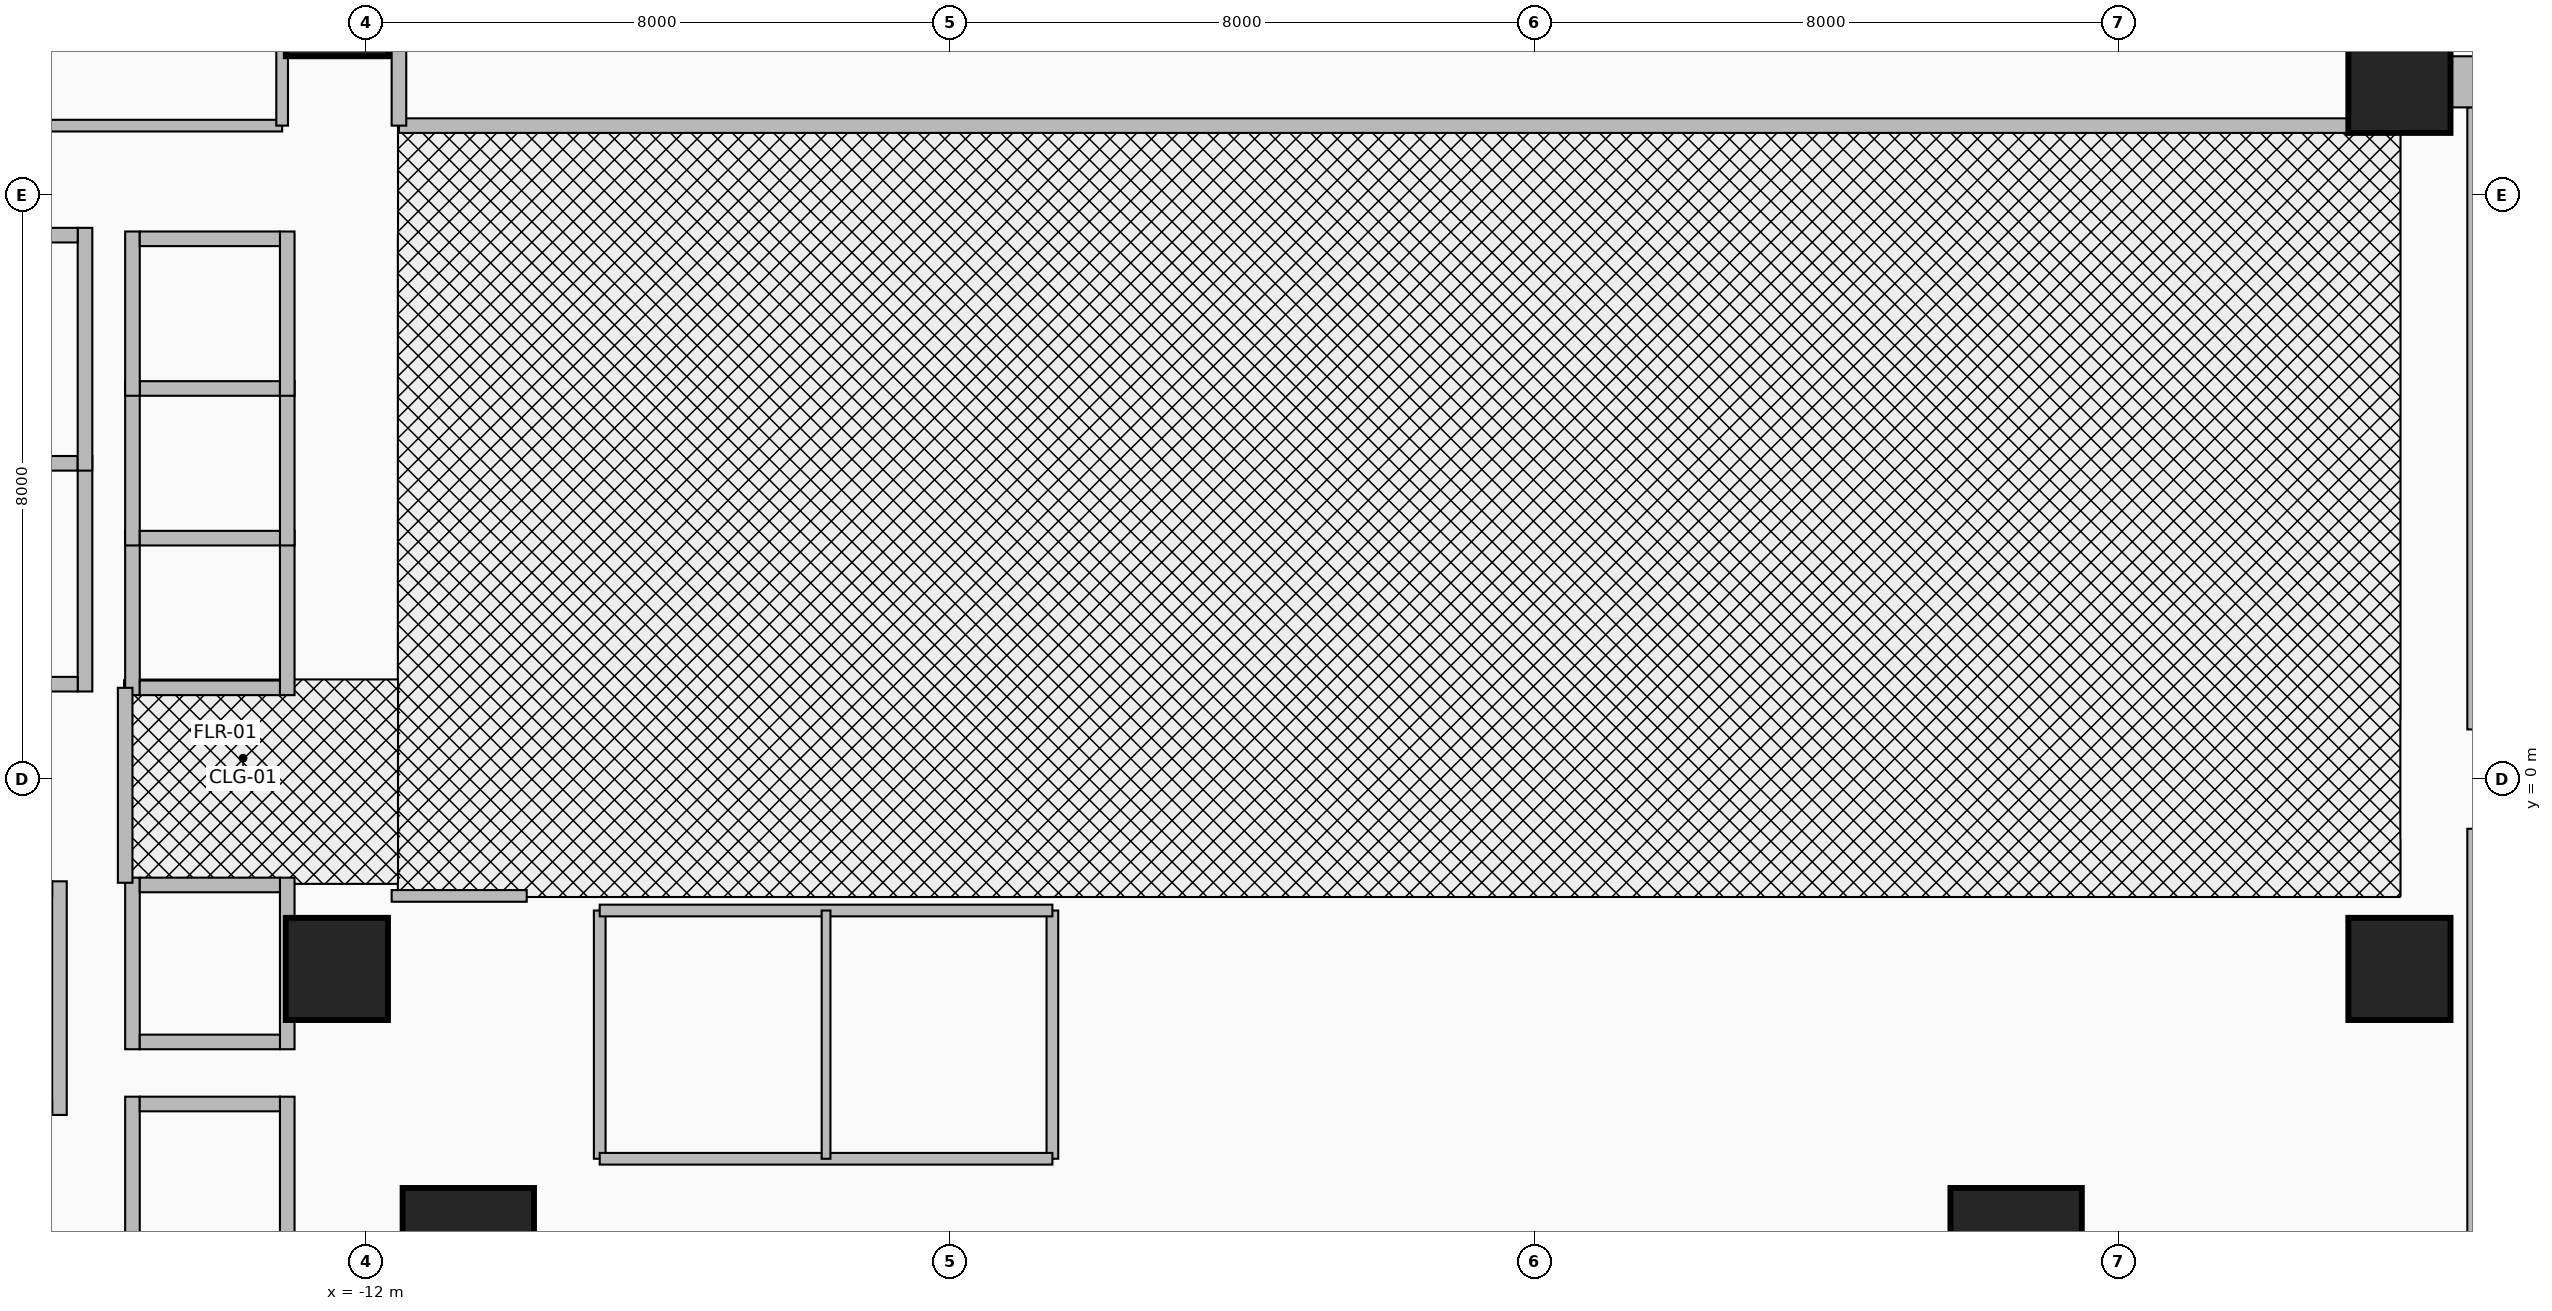
"""IFC4 building model, lengths in metres.
Left out: names, types, materials, properties, quantities, classifications, styles, units other than length and angle.
Written with IfcOpenShell. Run it as: python <this file> out.ifc"""

import sys

from ifc_helpers import new_model, si_unit, direction, frame, frame_2d, origin, origin_2d, place, context, subcontext, project, spatial, rectangle, extrude, source, transform, mapped, element, fill, save


model = new_model("IFC4")
c1 = context("Model", 3, precision=1e-05, world=origin(), true_north=direction((0.0, 1.0)))
c2 = subcontext(c1, "Body", "Model", "MODEL_VIEW")
j1 = project(units=[si_unit("LENGTHUNIT", "METRE"), si_unit("PLANEANGLEUNIT", "RADIAN")], contexts=[c1])
p1 = place(None, origin())
s1 = spatial("IfcSite", under=j1, at=p1, CompositionType="ELEMENT")
p2 = place(p1, origin())
s2 = spatial("IfcBuilding", under=s1, at=p2, CompositionType="ELEMENT")
p3 = place(p2, frame((0.0, 0.0, 20.8)))
s3 = spatial("IfcBuildingStorey", under=s2, at=p3, CompositionType="ELEMENT", Elevation=20.8)
for number, where, z_axis, x_axis in (
    (1, (16.89, 0.68, 0.0), (0.0, 0.0, 1.0), (0.0, 1.0, 0.0)),
    (2, (16.89, -9.2, 0.0), (0.0, 0.0, 1.0), (0.0, 1.0, 0.0)),
):
    element("IfcWall", number, at=place(p3, frame(where, z_axis=z_axis, x_axis=x_axis)), inside=s3, PredefinedType="SHEAR", context=c2, shape_type="SweptSolid", body=[
        extrude(rectangle(XDim=8.52, YDim=0.22, at=frame_2d((4.26, 0.0))), origin(), (0.0, 0.0, 1.0), 4.96),
    ])
p4 = place(p3, frame((15.85, 9.55, 0.0), z_axis=(0.0, 0.0, 1.0), x_axis=(1.0, 0.0, 0.0)))
e3 = element("IfcWall", 3, at=p4, inside=s3, PredefinedType="SHEAR", context=c2, shape_type="SweptSolid", body=[
    extrude(rectangle(XDim=9.0, YDim=0.7, at=frame_2d((4.5, 0.0))), origin(), (0.0, 0.0, 1.0), 4.96),
])
m1 = source(origin(), c2, "Body", "SweptSolid", [
    extrude(rectangle(XDim=1.4, YDim=1.4, at=origin_2d()), origin(), (0.0, 0.0, 1.0), 5.2),
])
for number, where, z_axis, x_axis in (
    (4, (-12.4, -2.6, 0.0), (0.0, 0.0, 1.0), (1.0, 0.0, 0.0)),
    (5, (-12.4, 10.6, 0.0), (0.0, 0.0, 1.0), (1.0, 0.0, 0.0)),
    (6, (15.85, -2.6, 0.0), (0.0, 0.0, 1.0), (1.0, 0.0, 0.0)),
    (7, (15.85, 9.55, 0.0), (0.0, 0.0, 1.0), (1.0, 0.0, 0.0)),
):
    element("IfcColumn", number, at=place(p3, frame(where, z_axis=z_axis, x_axis=x_axis)), inside=s3, PredefinedType="COLUMN", context=c2, shape_type="MappedRepresentation", body=[
        mapped(m1, transform((0.0, 0.0, 0.0), x_axis=(1.0, 0.0, 0.0), y_axis=(0.0, 1.0, 0.0), z_axis=(0.0, 0.0, 1.0), scale=1.0)),
    ])
m2 = source(origin(), c2, "Body", "SweptSolid", [
    extrude(rectangle(XDim=1.8, YDim=1.8, at=origin_2d()), origin(), (0.0, 0.0, 1.0), 5.2),
])
for number, where, z_axis, x_axis in (
    (8, (-10.6, -6.5, 0.0), (0.0, 0.0, 1.0), (1.0, 0.0, 0.0)),
    (9, (10.6, -6.5, 0.0), (0.0, 0.0, 1.0), (1.0, 0.0, 0.0)),
):
    element("IfcColumn", number, at=place(p3, frame(where, z_axis=z_axis, x_axis=x_axis)), inside=s3, PredefinedType="COLUMN", context=c2, shape_type="MappedRepresentation", body=[
        mapped(m2, transform((0.0, 0.0, 0.0), x_axis=(1.0, 0.0, 0.0), y_axis=(0.0, 1.0, 0.0), z_axis=(0.0, 0.0, 1.0), scale=1.0)),
    ])
p5 = place(p3, frame((-15.85, 1.2, 0.0), z_axis=(0.0, 0.0, 1.0), x_axis=(0.0, 1.0, 0.0)))
e10 = element("IfcWall", 10, at=p5, inside=s3, PredefinedType="MOVABLE", context=c2, shape_type="SweptSolid", body=[
    extrude(rectangle(XDim=3.225, YDim=0.2, at=frame_2d((1.613, 0.0))), origin(), (0.0, 0.0, 1.0), 4.96),
])
p6 = place(p3, frame((-18.55, 1.3, 0.0), z_axis=(0.0, 0.0, 1.0), x_axis=(1.0, 0.0, 0.0)))
e11 = element("IfcWall", 11, at=p6, inside=s3, PredefinedType="MOVABLE", context=c2, shape_type="SweptSolid", body=[
    extrude(rectangle(XDim=2.6, YDim=0.2, at=frame_2d((1.3, 0.0))), origin(), (0.0, 0.0, 1.0), 4.96),
])
p7 = place(p6, frame((0.7, 0.0, 0.0)))
e12 = element("IfcOpeningElement", 12, at=p7, cuts=e11, PredefinedType="OPENING", context=c2, shape_type="SweptSolid", body=[
    extrude(rectangle(XDim=1.2, YDim=2.1, at=frame_2d((0.6, 1.05))), frame((0.0, 0.115, 0.0), z_axis=(0.0, -1.0, 0.0), x_axis=(1.0, 0.0, 0.0)), (0.0, 0.0, 1.0), 0.23),
])
p8 = place(p3, frame((-18.55, 4.325, 0.0), z_axis=(0.0, 0.0, 1.0), x_axis=(1.0, 0.0, 0.0)))
e13 = element("IfcWall", 13, at=p8, inside=s3, PredefinedType="MOVABLE", context=c2, shape_type="SweptSolid", body=[
    extrude(rectangle(XDim=2.6, YDim=0.2, at=frame_2d((1.3, 0.0))), origin(), (0.0, 0.0, 1.0), 4.96),
])
p9 = place(p3, frame((-16.2, -4.6, 0.0), z_axis=(0.0, 0.0, 1.0), x_axis=(0.0, 1.0, 0.0)))
e14 = element("IfcWall", 14, at=p9, inside=s3, PredefinedType="MOVABLE", context=c2, shape_type="SweptSolid", body=[
    extrude(rectangle(XDim=3.2, YDim=0.2, at=frame_2d((1.6, 0.0))), origin(), (0.0, 0.0, 1.0), 4.96),
])
p10 = place(p3, frame((-15.85, 4.225, 0.0), z_axis=(0.0, 0.0, 1.0), x_axis=(0.0, 1.0, 0.0)))
e15 = element("IfcWall", 15, at=p10, inside=s3, PredefinedType="MOVABLE", context=c2, shape_type="SweptSolid", body=[
    extrude(rectangle(XDim=3.325, YDim=0.2, at=frame_2d((1.663, 0.0))), origin(), (0.0, 0.0, 1.0), 4.96),
])
p11 = place(p3, frame((-18.55, 7.45, 0.0), z_axis=(0.0, 0.0, 1.0), x_axis=(1.0, 0.0, 0.0)))
e16 = element("IfcWall", 16, at=p11, inside=s3, PredefinedType="MOVABLE", context=c2, shape_type="SweptSolid", body=[
    extrude(rectangle(XDim=2.6, YDim=0.2, at=frame_2d((1.3, 0.0))), origin(), (0.0, 0.0, 1.0), 4.96),
])
p12 = place(p11, frame((0.7, 0.0, 0.0)))
e17 = element("IfcOpeningElement", 17, at=p12, cuts=e16, PredefinedType="OPENING", context=c2, shape_type="SweptSolid", body=[
    extrude(rectangle(XDim=1.2, YDim=2.1, at=frame_2d((0.6, 1.05))), frame((0.0, 0.115, 0.0), z_axis=(0.0, -1.0, 0.0), x_axis=(1.0, 0.0, 0.0)), (0.0, 0.0, 1.0), 0.23),
])
for number, where, z_axis, x_axis in (
    (18, (-15.2, -6.7, 0.0), (0.0, 0.0, 1.0), (0.0, 1.0, 0.0)),
    (19, (-13.08, -6.7, 0.0), (0.0, 0.0, 1.0), (0.0, 1.0, 0.0)),
):
    element("IfcWall", number, at=place(p3, frame(where, z_axis=z_axis, x_axis=x_axis)), inside=s3, PredefinedType="MOVABLE", context=c2, shape_type="SweptSolid", body=[
        extrude(rectangle(XDim=2.35, YDim=0.2, at=frame_2d((1.175, 0.0))), origin(), (0.0, 0.0, 1.0), 4.96),
    ])
p13 = place(p3, frame((-15.1, -4.45, 0.0), z_axis=(0.0, 0.0, 1.0), x_axis=(1.0, 0.0, 0.0)))
e20 = element("IfcWall", 20, at=p13, inside=s3, PredefinedType="MOVABLE", context=c2, shape_type="SweptSolid", body=[
    extrude(rectangle(XDim=1.92, YDim=0.2, at=frame_2d((0.96, 0.0))), origin(), (0.0, 0.0, 1.0), 4.96),
])
for number, where, z_axis, x_axis in (
    (21, (-15.2, 1.15, 0.0), (0.0, 0.0, 1.0), (0.0, 1.0, 0.0)),
    (22, (-13.08, 1.15, 0.0), (0.0, 0.0, 1.0), (0.0, 1.0, 0.0)),
):
    element("IfcWall", number, at=place(p3, frame(where, z_axis=z_axis, x_axis=x_axis)), inside=s3, PredefinedType="MOVABLE", context=c2, shape_type="SweptSolid", body=[
        extrude(rectangle(XDim=2.25, YDim=0.2, at=frame_2d((1.125, 0.0))), origin(), (0.0, 0.0, 1.0), 4.96),
    ])
p14 = place(p3, frame((-15.1, 1.25, 0.0), z_axis=(0.0, 0.0, 1.0), x_axis=(1.0, 0.0, 0.0)))
e23 = element("IfcWall", 23, at=p14, inside=s3, PredefinedType="MOVABLE", context=c2, shape_type="SweptSolid", body=[
    extrude(rectangle(XDim=1.92, YDim=0.2, at=frame_2d((0.96, 0.0))), origin(), (0.0, 0.0, 1.0), 4.96),
])
for number, where, z_axis, x_axis in (
    (24, (-15.2, 3.2, 0.0), (0.0, 0.0, 1.0), (0.0, 1.0, 0.0)),
    (25, (-13.08, 3.2, 0.0), (0.0, 0.0, 1.0), (0.0, 1.0, 0.0)),
):
    element("IfcWall", number, at=place(p3, frame(where, z_axis=z_axis, x_axis=x_axis)), inside=s3, PredefinedType="MOVABLE", context=c2, shape_type="SweptSolid", body=[
        extrude(rectangle(XDim=2.25, YDim=0.2, at=frame_2d((1.125, 0.0))), origin(), (0.0, 0.0, 1.0), 4.96),
    ])
for number, where, z_axis, x_axis in (
    (26, (-15.1, 3.3, 0.0), (0.0, 0.0, 1.0), (1.0, 0.0, 0.0)),
    (27, (-15.1, 5.35, 0.0), (0.0, 0.0, 1.0), (1.0, 0.0, 0.0)),
):
    element("IfcWall", number, at=place(p3, frame(where, z_axis=z_axis, x_axis=x_axis)), inside=s3, PredefinedType="MOVABLE", context=c2, shape_type="SweptSolid", body=[
        extrude(rectangle(XDim=1.92, YDim=0.2, at=frame_2d((0.96, 0.0))), origin(), (0.0, 0.0, 1.0), 4.96),
    ])
for number, where, z_axis, x_axis in (
    (28, (-15.2, 5.25, 0.0), (0.0, 0.0, 1.0), (0.0, 1.0, 0.0)),
    (29, (-13.08, 5.25, 0.0), (0.0, 0.0, 1.0), (0.0, 1.0, 0.0)),
):
    element("IfcWall", number, at=place(p3, frame(where, z_axis=z_axis, x_axis=x_axis)), inside=s3, PredefinedType="MOVABLE", context=c2, shape_type="SweptSolid", body=[
        extrude(rectangle(XDim=2.25, YDim=0.2, at=frame_2d((1.125, 0.0))), origin(), (0.0, 0.0, 1.0), 4.96),
    ])
p15 = place(p3, frame((-15.1, 7.4, 0.0), z_axis=(0.0, 0.0, 1.0), x_axis=(1.0, 0.0, 0.0)))
e30 = element("IfcWall", 30, at=p15, inside=s3, PredefinedType="MOVABLE", context=c2, shape_type="SweptSolid", body=[
    extrude(rectangle(XDim=1.92, YDim=0.2, at=frame_2d((0.96, 0.0))), origin(), (0.0, 0.0, 1.0), 4.96),
])
for number, where, z_axis, x_axis in (
    (31, (-15.2, -3.7, 0.0), (0.0, 0.0, 1.0), (0.0, 1.0, 0.0)),
    (32, (-13.08, -3.7, 0.0), (0.0, 0.0, 1.0), (0.0, 1.0, 0.0)),
):
    element("IfcWall", number, at=place(p3, frame(where, z_axis=z_axis, x_axis=x_axis)), inside=s3, PredefinedType="MOVABLE", context=c2, shape_type="SweptSolid", body=[
        extrude(rectangle(XDim=2.35, YDim=0.2, at=frame_2d((1.175, 0.0))), origin(), (0.0, 0.0, 1.0), 4.96),
    ])
for number, where, z_axis, x_axis in (
    (33, (-15.1, -3.6, 0.0), (0.0, 0.0, 1.0), (1.0, 0.0, 0.0)),
    (34, (-15.1, -1.45, 0.0), (0.0, 0.0, 1.0), (1.0, 0.0, 0.0)),
):
    element("IfcWall", number, at=place(p3, frame(where, z_axis=z_axis, x_axis=x_axis)), inside=s3, PredefinedType="MOVABLE", context=c2, shape_type="SweptSolid", body=[
        extrude(rectangle(XDim=1.92, YDim=0.2, at=frame_2d((0.96, 0.0))), origin(), (0.0, 0.0, 1.0), 4.96),
    ])
p16 = place(p3, frame((-15.3, -1.42, 0.0), z_axis=(0.0, 0.0, 1.0), x_axis=(0.0, 1.0, 0.0)))
e35 = element("IfcWall", 35, at=p16, inside=s3, PredefinedType="PARTITIONING", context=c2, shape_type="SweptSolid", body=[
    extrude(rectangle(XDim=2.67, YDim=0.2, at=frame_2d((1.335, 0.0))), origin(), (0.0, 0.0, 1.0), 4.96),
])
p17 = place(p16, frame((0.78, 0.0, 0.0)))
e36 = element("IfcOpeningElement", 36, at=p17, cuts=e35, PredefinedType="OPENING", context=c2, shape_type="SweptSolid", body=[
    extrude(rectangle(XDim=1.05, YDim=2.15, at=frame_2d((0.525, 1.075))), frame((0.0, 0.115, 0.0), z_axis=(0.0, -1.0, 0.0), x_axis=(1.0, 0.0, 0.0)), (0.0, 0.0, 1.0), 0.23),
])
p18 = place(p3, frame((-18.65, 8.95, 0.0), z_axis=(0.0, 0.0, 1.0), x_axis=(1.0, 0.0, 0.0)))
e37 = element("IfcWall", 37, at=p18, inside=s3, PredefinedType="PARTITIONING", context=c2, shape_type="SweptSolid", body=[
    extrude(rectangle(XDim=5.5, YDim=0.16, at=frame_2d((2.75, 0.0))), origin(), (0.0, 0.0, 1.0), 4.96),
])
p19 = place(p18, frame((0.3, 0.0, 0.0)))
e38 = element("IfcOpeningElement", 38, at=p19, cuts=e37, PredefinedType="OPENING", context=c2, shape_type="SweptSolid", body=[
    extrude(rectangle(XDim=0.85, YDim=2.05, at=frame_2d((0.425, 1.025))), frame((0.0, 0.095, 0.0), z_axis=(0.0, -1.0, 0.0), x_axis=(1.0, 0.0, 0.0)), (0.0, 0.0, 1.0), 0.19),
])
p20 = place(p18, frame((2.5, 0.0, 0.0)))
e39 = element("IfcOpeningElement", 39, at=p20, cuts=e37, PredefinedType="OPENING", context=c2, shape_type="SweptSolid", body=[
    extrude(rectangle(XDim=0.95, YDim=2.15, at=frame_2d((0.475, 1.075))), frame((0.0, 0.095, 0.0), z_axis=(0.0, -1.0, 0.0), x_axis=(1.0, 0.0, 0.0)), (0.0, 0.0, 1.0), 0.19),
])
p21 = place(p3, frame((-13.15, 8.95, 0.0), z_axis=(0.0, 0.0, 1.0), x_axis=(0.0, 1.0, 0.0)))
e40 = element("IfcWall", 40, at=p21, inside=s3, PredefinedType="PARTITIONING", context=c2, shape_type="SweptSolid", body=[
    extrude(rectangle(XDim=1.43, YDim=0.16, at=frame_2d((0.715, 0.0))), origin(), (0.0, 0.0, 1.0), 3.745),
])
for number, where, z_axis, x_axis in (
    (41, (-8.8, -5.2, 0.0), (0.0, 0.0, 1.0), (0.0, 1.0, 0.0)),
    (42, (-2.6, -5.2, 0.0), (0.0, 0.0, 1.0), (0.0, 1.0, 0.0)),
):
    element("IfcWall", number, at=place(p3, frame(where, z_axis=z_axis, x_axis=x_axis)), inside=s3, PredefinedType="PARTITIONING", context=c2, shape_type="SweptSolid", body=[
        extrude(rectangle(XDim=3.4, YDim=0.16, at=frame_2d((1.7, 0.0))), origin(), (0.0, 0.0, 1.0), 4.96),
    ])
p22 = place(p3, frame((-8.8, -5.2, 0.0), z_axis=(0.0, 0.0, 1.0), x_axis=(1.0, 0.0, 0.0)))
e43 = element("IfcWall", 43, at=p22, inside=s3, PredefinedType="PARTITIONING", context=c2, shape_type="SweptSolid", body=[
    extrude(rectangle(XDim=6.2, YDim=0.16, at=frame_2d((3.1, 0.0))), origin(), (0.0, 0.0, 1.0), 4.96),
])
p23 = place(p3, frame((-8.8, -1.8, 0.0), z_axis=(0.0, 0.0, 1.0), x_axis=(1.0, 0.0, 0.0)))
e44 = element("IfcWall", 44, at=p23, inside=s3, PredefinedType="PARTITIONING", context=c2, shape_type="SweptSolid", body=[
    extrude(rectangle(XDim=6.2, YDim=0.16, at=frame_2d((3.1, 0.0))), origin(), (0.0, 0.0, 1.0), 4.96),
])
p24 = place(p23, frame((0.3, 0.0, 0.0)))
e45 = element("IfcOpeningElement", 45, at=p24, cuts=e44, PredefinedType="OPENING", context=c2, shape_type="SweptSolid", body=[
    extrude(rectangle(XDim=0.85, YDim=2.1, at=frame_2d((0.425, 1.05))), frame((0.0, 0.095, 0.0), z_axis=(0.0, -1.0, 0.0), x_axis=(1.0, 0.0, 0.0)), (0.0, 0.0, 1.0), 0.19),
])
p25 = place(p23, frame((3.35, 0.0, 0.0)))
e46 = element("IfcOpeningElement", 46, at=p25, cuts=e44, PredefinedType="OPENING", context=c2, shape_type="SweptSolid", body=[
    extrude(rectangle(XDim=0.85, YDim=2.1, at=frame_2d((0.425, 1.05))), frame((0.0, 0.095, 0.0), z_axis=(0.0, -1.0, 0.0), x_axis=(1.0, 0.0, 0.0)), (0.0, 0.0, 1.0), 0.19),
])
p26 = place(p3, frame((-5.7, -5.2, 0.0), z_axis=(0.0, 0.0, 1.0), x_axis=(0.0, 1.0, 0.0)))
e47 = element("IfcWall", 47, at=p26, inside=s3, PredefinedType="PARTITIONING", context=c2, shape_type="SweptSolid", body=[
    extrude(rectangle(XDim=3.4, YDim=0.12, at=frame_2d((1.7, 0.0))), origin(), (0.0, 0.0, 1.0), 4.96),
])
p27 = place(p3, frame((-11.65, -1.6, 0.0), z_axis=(0.0, 0.0, 1.0), x_axis=(1.0, 0.0, 0.0)))
e48 = element("IfcWall", 48, at=p27, inside=s3, PredefinedType="PARTITIONING", context=c2, shape_type="SweptSolid", body=[
    extrude(rectangle(XDim=1.85, YDim=0.16, at=frame_2d((0.925, 0.0))), origin(), (0.0, 0.0, 1.0), 4.96),
])
p28 = place(p3, frame((-11.55, 8.95, 0.0), z_axis=(0.0, 0.0, 1.0), x_axis=(1.0, 0.0, 0.0)))
e49 = element("IfcWall", 49, at=p28, inside=s3, PredefinedType="PARTITIONING", context=c2, shape_type="SweptSolid", body=[
    extrude(rectangle(XDim=27.4, YDim=0.2, at=frame_2d((13.7, 0.0))), origin(), (0.0, 0.0, 1.0), 3.745),
])
for number, where, z_axis, x_axis in (
    (50, (-11.55, 8.95, 0.0), (0.0, 0.0, 1.0), (0.0, 1.0, 0.0)),
    (51, (15.85, 8.95, 0.0), (0.0, 0.0, 1.0), (0.0, 1.0, 0.0)),
):
    element("IfcWall", number, at=place(p3, frame(where, z_axis=z_axis, x_axis=x_axis)), inside=s3, PredefinedType="PARTITIONING", context=c2, shape_type="SweptSolid", body=[
        extrude(rectangle(XDim=6.7, YDim=0.2, at=frame_2d((3.35, 0.0))), origin(), (0.0, 0.0, 1.0), 3.745),
    ])
p29 = place(p17, origin())
e52 = element("IfcDoor", 52, at=p29, inside=s3, OperationType="SINGLE_SWING_RIGHT", PredefinedType="DOOR", context=c2, shape_type="SweptSolid", body=[
    extrude(rectangle(XDim=1.05, YDim=2.15, at=frame_2d((0.525, 1.075))), frame((0.0, 0.025, 0.0), z_axis=(0.0, -1.0, 0.0), x_axis=(1.0, 0.0, 0.0)), (0.0, 0.0, 1.0), 0.05),
])
fill(e36, e52)
p30 = place(p20, origin())
e53 = element("IfcDoor", 53, at=p30, inside=s3, OperationType="SINGLE_SWING_RIGHT", PredefinedType="DOOR", context=c2, shape_type="SweptSolid", body=[
    extrude(rectangle(XDim=0.95, YDim=2.15, at=frame_2d((0.475, 1.075))), frame((0.0, 0.025, 0.0), z_axis=(0.0, -1.0, 0.0), x_axis=(1.0, 0.0, 0.0)), (0.0, 0.0, 1.0), 0.05),
])
fill(e39, e53)
p31 = place(p24, origin())
e54 = element("IfcDoor", 54, at=p31, inside=s3, OperationType="SINGLE_SWING_LEFT", PredefinedType="DOOR", context=c2, shape_type="SweptSolid", body=[
    extrude(rectangle(XDim=0.85, YDim=2.1, at=frame_2d((0.425, 1.05))), frame((0.0, 0.025, 0.0), z_axis=(0.0, -1.0, 0.0), x_axis=(1.0, 0.0, 0.0)), (0.0, 0.0, 1.0), 0.05),
])
fill(e45, e54)
p32 = place(p25, origin())
e55 = element("IfcDoor", 55, at=p32, inside=s3, OperationType="SINGLE_SWING_RIGHT", PredefinedType="DOOR", context=c2, shape_type="SweptSolid", body=[
    extrude(rectangle(XDim=0.85, YDim=2.1, at=frame_2d((0.425, 1.05))), frame((0.0, 0.025, 0.0), z_axis=(0.0, -1.0, 0.0), x_axis=(1.0, 0.0, 0.0)), (0.0, 0.0, 1.0), 0.05),
])
fill(e46, e55)
save(model, sys.argv[1])
